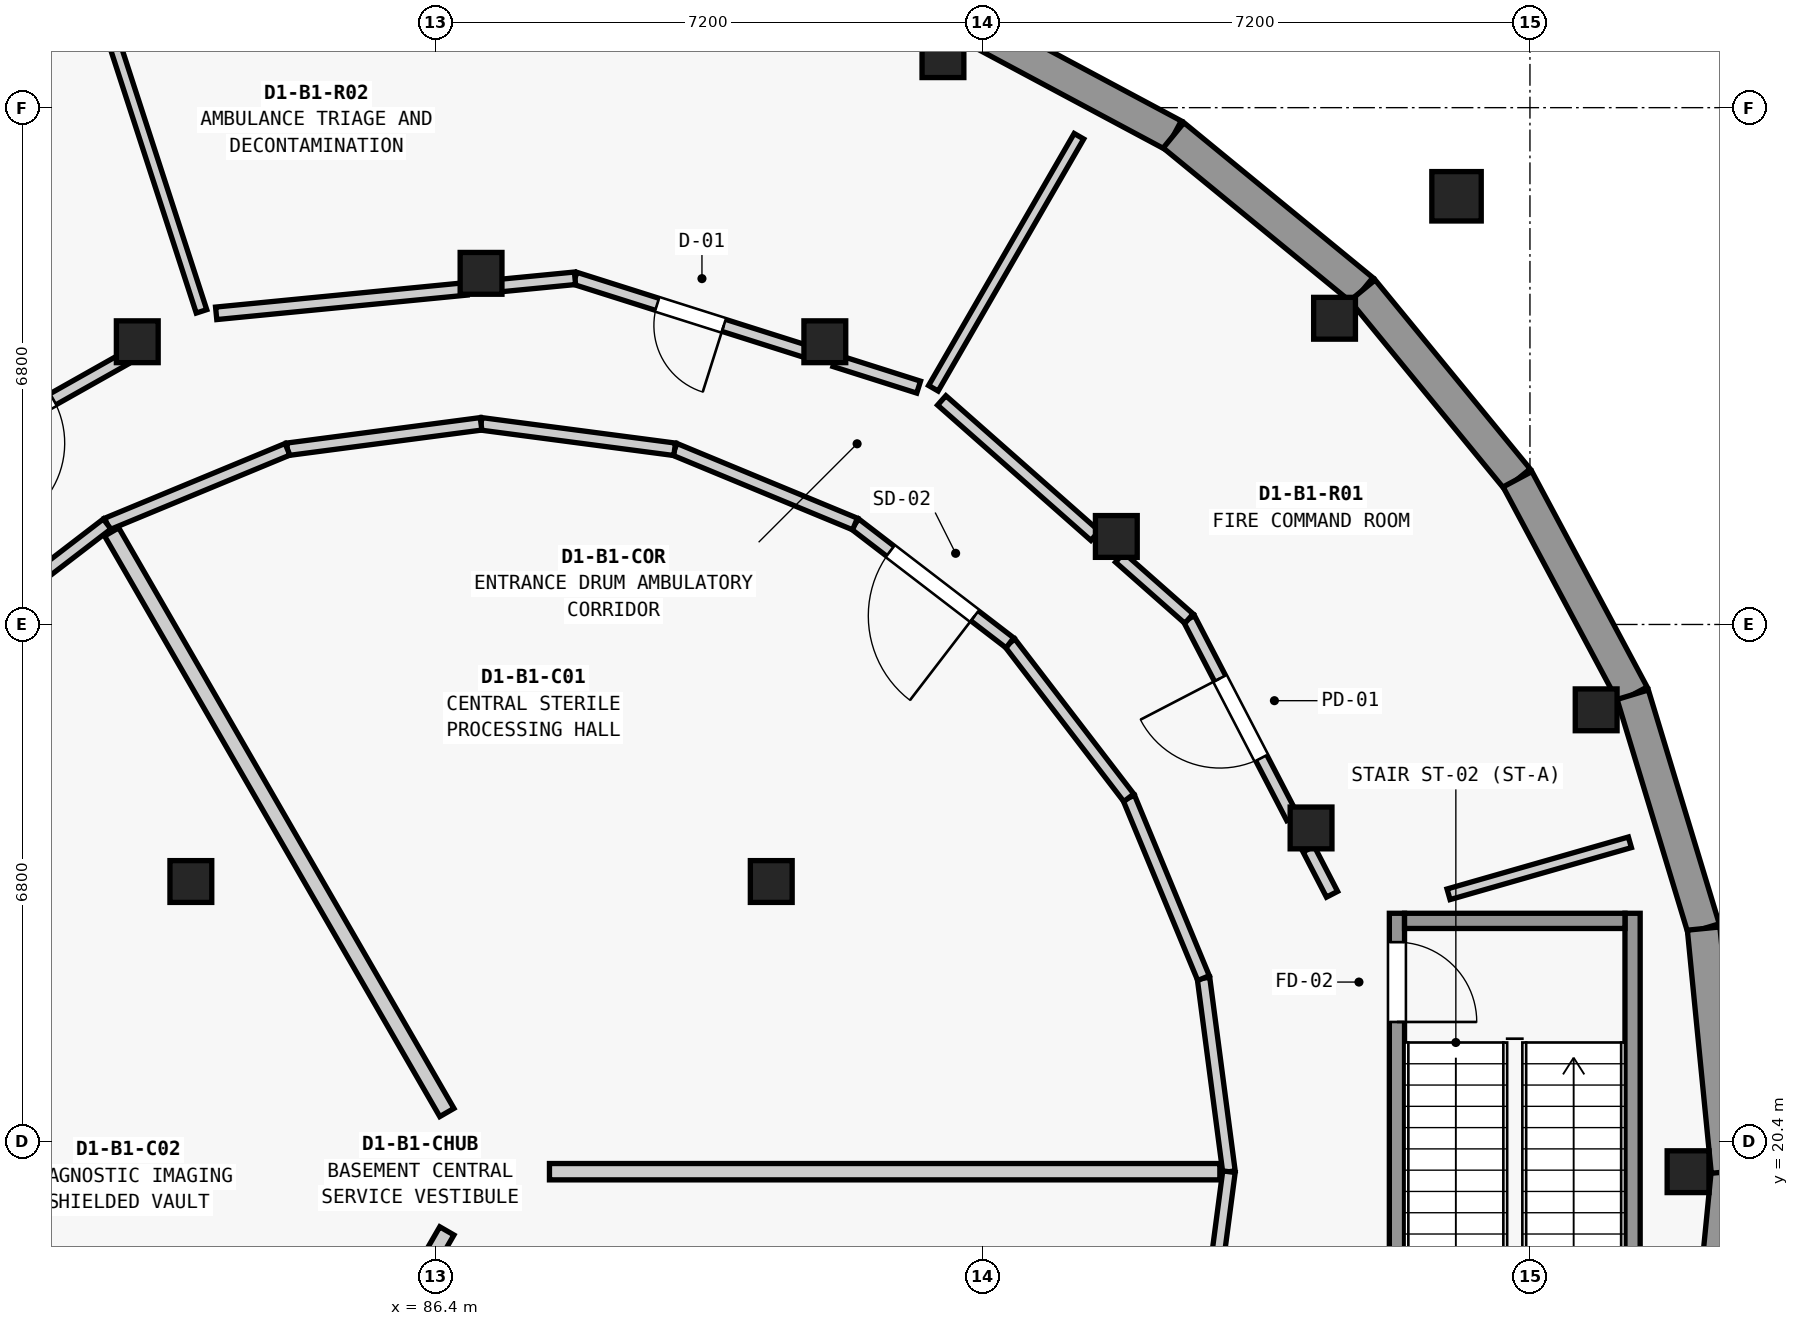
"""IFC4 building model, lengths in metres.
Left out: names, types, materials, properties, quantities, classifications, styles, units other than length and angle.
Written with IfcOpenShell. Run it as: python <this file> out.ifc"""

import sys

from ifc_helpers import new_model, si_unit, direction, frame, frame_2d, origin, origin_2d, place, context, subcontext, project, spatial, rectangle, extrude, element, fill, save


model = new_model("IFC4")
c1 = context("Model", 3, precision=1e-05, world=origin(), true_north=direction((0.0, 1.0)))
c2 = subcontext(c1, "Body", "Model", "MODEL_VIEW")
j1 = project(units=[si_unit("LENGTHUNIT", "METRE"), si_unit("PLANEANGLEUNIT", "RADIAN")], contexts=[c1])
p1 = place(None, origin())
s1 = spatial("IfcSite", under=j1, at=p1, CompositionType="ELEMENT")
p2 = place(p1, origin())
s2 = spatial("IfcBuilding", under=s1, at=p2, CompositionType="ELEMENT")
p3 = place(p2, frame((0.0, 0.0, -4.55)))
s3 = spatial("IfcBuildingStorey", under=s2, at=p3, CompositionType="ELEMENT", Elevation=-4.55)
for number, where, z_axis, x_axis in (
    (1, (102.88, 20.0, 0.0), (0.0, 0.0, 1.0), (1.0, 0.0, 0.0)),
    (2, (101.671, 26.077, 0.0), (0.0, 0.0, 1.0), (1.0, 0.0, 0.0)),
    (3, (98.229, 31.229, 0.0), (0.0, 0.0, 1.0), (1.0, 0.0, 0.0)),
    (4, (93.077, 34.671, 0.0), (0.0, 0.0, 1.0), (1.0, 0.0, 0.0)),
    (5, (97.92, 24.523, 0.0), (0.0, 0.0, 1.0), (1.0, 0.0, 0.0)),
    (6, (95.358, 28.358, 0.0), (0.0, 0.0, 1.0), (1.0, 0.0, 0.0)),
    (7, (91.523, 30.92, 0.0), (0.0, 0.0, 1.0), (1.0, 0.0, 0.0)),
    (8, (87.0, 31.82, 0.0), (0.0, 0.0, 1.0), (1.0, 0.0, 0.0)),
    (9, (82.477, 30.92, 0.0), (0.0, 0.0, 1.0), (1.0, 0.0, 0.0)),
    (10, (90.818, 23.818, 0.0), (0.0, 0.0, 1.0), (1.0, 0.0, 0.0)),
    (11, (83.182, 23.818, 0.0), (0.0, 0.0, 1.0), (1.0, 0.0, 0.0)),
):
    element("IfcColumn", number, at=place(p3, frame(where, z_axis=z_axis, x_axis=x_axis)), inside=s3, PredefinedType="COLUMN", context=c2, shape_type="SweptSolid", body=[
        extrude(rectangle(XDim=0.55, YDim=0.55, at=origin_2d()), origin(), (0.0, 0.0, 1.0), 4.55),
    ])
p4 = place(p3, frame((99.834, 32.834, 0.0), z_axis=(0.0, 0.0, 1.0), x_axis=(1.0, 0.0, 0.0)))
e12 = element("IfcColumn", 12, at=p4, inside=s3, PredefinedType="COLUMN", context=c2, shape_type="SweptSolid", body=[
    extrude(rectangle(XDim=0.65, YDim=0.65, at=origin_2d()), origin(), (0.0, 0.0, 1.0), 4.55),
])
p5 = place(p3, frame((103.4, 20.0, 0.0), z_axis=(0.0, 0.0, 1.0), x_axis=(-0.097977057849, -0.995188673637, 0.0)))
e13 = element("IfcWall", 13, at=p5, inside=s3, PredefinedType="USERDEFINED", context=c2, shape_type="SweptSolid", body=[
    extrude(rectangle(XDim=3.214, YDim=0.43, at=frame_2d((1.607, 0.0))), origin(), (0.0, 0.0, 1.0), 3.335),
])
for number, where, z_axis, x_axis in (
    (14, (93.276, 35.152, 0.0), (0.0, 0.0, 1.0), (0.882, -0.472, 0.0)),
    (15, (96.111, 33.636, 0.0), (0.0, 0.0, 1.0), (0.773, -0.634, 0.0)),
    (16, (98.597, 31.597, 0.0), (0.0, 0.0, 1.0), (0.634, -0.773, 0.0)),
    (17, (100.636, 29.111, 0.0), (0.0, 0.0, 1.0), (0.472, -0.882, 0.0)),
    (18, (102.152, 26.276, 0.0), (0.0, 0.0, 1.0), (0.29, -0.957, 0.0)),
):
    element("IfcWall", number, at=place(p3, frame(where, z_axis=z_axis, x_axis=x_axis)), inside=s3, PredefinedType="USERDEFINED", context=c2, shape_type="SweptSolid", body=[
        extrude(rectangle(XDim=3.215, YDim=0.43, at=frame_2d((1.607, 0.0))), origin(), (0.0, 0.0, 1.0), 3.335),
    ])
p6 = place(p3, frame((103.085, 23.199, 0.0), z_axis=(0.0, 0.0, 1.0), x_axis=(0.097977057849, -0.995188673637, 0.0)))
e19 = element("IfcWall", 19, at=p6, inside=s3, PredefinedType="USERDEFINED", context=c2, shape_type="SweptSolid", body=[
    extrude(rectangle(XDim=3.214, YDim=0.43, at=frame_2d((1.607, 0.0))), origin(), (0.0, 0.0, 1.0), 3.335),
])
p7 = place(p3, frame((99.05, 23.4, 0.0), z_axis=(0.0, 0.0, 1.0), x_axis=(0.0, -1.0, 0.0)))
e20 = element("IfcWall", 20, at=p7, inside=s3, PredefinedType="SHEAR", context=c2, shape_type="SweptSolid", body=[
    extrude(rectangle(XDim=6.8, YDim=0.2, at=frame_2d((3.4, 0.0))), origin(), (0.0, 0.0, 1.0), 4.135),
])
p8 = place(p7, frame((0.38, 0.0, 0.0)))
e21 = element("IfcOpeningElement", 21, at=p8, cuts=e20, PredefinedType="OPENING", context=c2, shape_type="SweptSolid", body=[
    extrude(rectangle(XDim=1.05, YDim=2.15, at=frame_2d((0.525, 1.075))), frame((0.0, 0.11, 0.0), z_axis=(0.0, -1.0, 0.0), x_axis=(1.0, 0.0, 0.0)), (0.0, 0.0, 1.0), 0.22),
])
p9 = place(p3, frame((102.15, 23.4, 0.0), z_axis=(0.0, 0.0, 1.0), x_axis=(0.0, -1.0, 0.0)))
e22 = element("IfcWall", 22, at=p9, inside=s3, PredefinedType="SHEAR", context=c2, shape_type="SweptSolid", body=[
    extrude(rectangle(XDim=6.8, YDim=0.2, at=frame_2d((3.4, 0.0))), origin(), (0.0, 0.0, 1.0), 4.135),
])
p10 = place(p3, frame((99.15, 23.3, 0.0), z_axis=(0.0, 0.0, 1.0), x_axis=(1.0, 0.0, 0.0)))
e23 = element("IfcWall", 23, at=p10, inside=s3, PredefinedType="SHEAR", context=c2, shape_type="SweptSolid", body=[
    extrude(rectangle(XDim=2.9, YDim=0.2, at=frame_2d((1.45, 0.0))), origin(), (0.0, 0.0, 1.0), 4.135),
])
p11 = place(p3, frame((87.9, 20.0, 0.0), z_axis=(0.0, 0.0, 1.0), x_axis=(1.0, 0.0, 0.0)))
e24 = element("IfcWall", 24, at=p11, inside=s3, PredefinedType="SOLIDWALL", context=c2, shape_type="SweptSolid", body=[
    extrude(rectangle(XDim=8.82, YDim=0.215, at=frame_2d((4.41, 0.0))), origin(), (0.0, 0.0, 1.0), 2.76),
])
for number, where, z_axis, x_axis in (
    (25, (86.55, 20.779, 0.0), (0.0, 0.0, 1.0), (-0.5, 0.866, 0.0)),
    (26, (86.55, 19.221, 0.0), (0.0, 0.0, 1.0), (-0.5, -0.866, 0.0)),
):
    element("IfcWall", number, at=place(p3, frame(where, z_axis=z_axis, x_axis=x_axis)), inside=s3, PredefinedType="SOLIDWALL", context=c2, shape_type="SweptSolid", body=[
        extrude(rectangle(XDim=8.821, YDim=0.215, at=frame_2d((4.41, 0.0))), origin(), (0.0, 0.0, 1.0), 2.76),
    ])
p12 = place(p3, frame((96.84, 20.0, 0.0), z_axis=(0.0, 0.0, 1.0), x_axis=(-0.130476636685, 0.991451384224, 0.0)))
e27 = element("IfcWall", 27, at=p12, inside=s3, PredefinedType="PARTITIONING", context=c2, shape_type="SweptSolid", body=[
    extrude(rectangle(XDim=2.569, YDim=0.165, at=frame_2d((1.285, 0.0))), origin(), (0.0, 0.0, 1.0), 2.76),
])
p13 = place(p3, frame((96.505, 22.547, 0.0), z_axis=(0.0, 0.0, 1.0), x_axis=(-0.382704397106, 0.923870848353, 0.0)))
e28 = element("IfcWall", 28, at=p13, inside=s3, PredefinedType="PARTITIONING", context=c2, shape_type="SweptSolid", body=[
    extrude(rectangle(XDim=2.568, YDim=0.165, at=frame_2d((1.284, 0.0))), origin(), (0.0, 0.0, 1.0), 2.76),
])
p14 = place(p3, frame((95.522, 24.92, 0.0), z_axis=(0.0, 0.0, 1.0), x_axis=(-0.608782621434, 0.793337078322, 0.0)))
e29 = element("IfcWall", 29, at=p14, inside=s3, PredefinedType="PARTITIONING", context=c2, shape_type="SweptSolid", body=[
    extrude(rectangle(XDim=2.569, YDim=0.165, at=frame_2d((1.285, 0.0))), origin(), (0.0, 0.0, 1.0), 2.76),
])
p15 = place(p3, frame((93.958, 26.958, 0.0), z_axis=(0.0, 0.0, 1.0), x_axis=(-0.793337078322, 0.608782621434, 0.0)))
e30 = element("IfcWall", 30, at=p15, inside=s3, PredefinedType="PARTITIONING", context=c2, shape_type="SweptSolid", body=[
    extrude(rectangle(XDim=2.569, YDim=0.165, at=frame_2d((1.285, 0.0))), origin(), (0.0, 0.0, 1.0), 2.76),
])
p16 = place(p15, frame((0.584, 0.0, 0.0)))
e31 = element("IfcOpeningElement", 31, at=p16, cuts=e30, PredefinedType="OPENING", context=c2, shape_type="SweptSolid", body=[
    extrude(rectangle(XDim=1.4, YDim=2.25, at=frame_2d((0.7, 1.125))), frame((0.0, 0.093, 0.0), z_axis=(0.0, -1.0, 0.0), x_axis=(1.0, 0.0, 0.0)), (0.0, 0.0, 1.0), 0.185),
])
p17 = place(p3, frame((91.92, 28.522, 0.0), z_axis=(0.0, 0.0, 1.0), x_axis=(-0.923870848353, 0.382704397106, 0.0)))
e32 = element("IfcWall", 32, at=p17, inside=s3, PredefinedType="PARTITIONING", context=c2, shape_type="SweptSolid", body=[
    extrude(rectangle(XDim=2.568, YDim=0.165, at=frame_2d((1.284, 0.0))), origin(), (0.0, 0.0, 1.0), 2.76),
])
for number, where, z_axis, x_axis in (
    (33, (89.547, 29.505, 0.0), (0.0, 0.0, 1.0), (-0.991, 0.13, 0.0)),
    (34, (87.0, 29.84, 0.0), (0.0, 0.0, 1.0), (-0.991, -0.13, 0.0)),
):
    element("IfcWall", number, at=place(p3, frame(where, z_axis=z_axis, x_axis=x_axis)), inside=s3, PredefinedType="PARTITIONING", context=c2, shape_type="SweptSolid", body=[
        extrude(rectangle(XDim=2.569, YDim=0.165, at=frame_2d((1.285, 0.0))), origin(), (0.0, 0.0, 1.0), 2.76),
    ])
p18 = place(p3, frame((84.453, 29.505, 0.0), z_axis=(0.0, 0.0, 1.0), x_axis=(-0.923870848353, -0.382704397106, 0.0)))
e35 = element("IfcWall", 35, at=p18, inside=s3, PredefinedType="PARTITIONING", context=c2, shape_type="SweptSolid", body=[
    extrude(rectangle(XDim=2.568, YDim=0.165, at=frame_2d((1.284, 0.0))), origin(), (0.0, 0.0, 1.0), 2.76),
])
for number, where, z_axis, x_axis in (
    (36, (82.08, 28.522, 0.0), (0.0, 0.0, 1.0), (-0.793, -0.609, 0.0)),
    (37, (96.505, 17.453, 0.0), (0.0, 0.0, 1.0), (0.13, 0.991, 0.0)),
):
    element("IfcWall", number, at=place(p3, frame(where, z_axis=z_axis, x_axis=x_axis)), inside=s3, PredefinedType="PARTITIONING", context=c2, shape_type="SweptSolid", body=[
        extrude(rectangle(XDim=2.569, YDim=0.165, at=frame_2d((1.285, 0.0))), origin(), (0.0, 0.0, 1.0), 2.76),
    ])
p19 = place(p3, frame((99.729, 23.65, 0.0), z_axis=(0.0, 0.0, 1.0), x_axis=(0.96127114667, 0.275604395065, 0.0)))
e38 = element("IfcWall", 38, at=p19, inside=s3, PredefinedType="PARTITIONING", context=c2, shape_type="SweptSolid", body=[
    extrude(rectangle(XDim=2.482, YDim=0.145, at=frame_2d((1.241, 0.0))), origin(), (0.0, 0.0, 1.0), 2.76),
])
p20 = place(p3, frame((92.951, 30.308, 0.0), z_axis=(0.0, 0.0, 1.0), x_axis=(0.500116129234, 0.865958346157, 0.0)))
e39 = element("IfcWall", 39, at=p20, inside=s3, PredefinedType="PARTITIONING", context=c2, shape_type="SweptSolid", body=[
    extrude(rectangle(XDim=3.829, YDim=0.145, at=frame_2d((1.915, 0.0))), origin(), (0.0, 0.0, 1.0), 2.76),
])
p21 = place(p3, frame((83.322, 31.32, 0.0), z_axis=(0.0, 0.0, 1.0), x_axis=(-0.309188585957, 0.951000745696, 0.0)))
e40 = element("IfcWall", 40, at=p21, inside=s3, PredefinedType="PARTITIONING", context=c2, shape_type="SweptSolid", body=[
    extrude(rectangle(XDim=3.823, YDim=0.145, at=frame_2d((1.912, 0.0))), origin(), (0.0, 0.0, 1.0), 2.76),
])
p22 = place(p3, frame((98.196, 23.65, 0.0), z_axis=(0.0, 0.0, 1.0), x_axis=(-0.459700365361, 0.888074081418, 0.0)))
e41 = element("IfcWall", 41, at=p22, inside=s3, PredefinedType="PARTITIONING", context=c2, shape_type="SweptSolid", body=[
    extrude(rectangle(XDim=0.67, YDim=0.165, at=frame_2d((0.335, 0.0))), origin(), (0.0, 0.0, 1.0), 2.76),
])
p23 = place(p3, frame((97.674, 24.657, 0.0), z_axis=(0.0, 0.0, 1.0), x_axis=(-0.460725075704, 0.887542902973, 0.0)))
e42 = element("IfcWall", 42, at=p23, inside=s3, PredefinedType="PARTITIONING", context=c2, shape_type="SweptSolid", body=[
    extrude(rectangle(XDim=2.952, YDim=0.165, at=frame_2d((1.476, 0.0))), origin(), (0.0, 0.0, 1.0), 2.76),
])
p24 = place(p23, frame((0.886, 0.0, 0.0)))
e43 = element("IfcOpeningElement", 43, at=p24, cuts=e42, PredefinedType="OPENING", context=c2, shape_type="SweptSolid", body=[
    extrude(rectangle(XDim=1.18, YDim=2.2, at=frame_2d((0.59, 1.1))), frame((0.0, 0.093, 0.0), z_axis=(0.0, -1.0, 0.0), x_axis=(1.0, 0.0, 0.0)), (0.0, 0.0, 1.0), 0.185),
])
p25 = place(p3, frame((96.314, 27.277, 0.0), z_axis=(0.0, 0.0, 1.0), x_axis=(-0.749697254826, 0.661780950244, 0.0)))
e44 = element("IfcWall", 44, at=p25, inside=s3, PredefinedType="PARTITIONING", context=c2, shape_type="SweptSolid", body=[
    extrude(rectangle(XDim=1.216, YDim=0.165, at=frame_2d((0.608, 0.0))), origin(), (0.0, 0.0, 1.0), 2.76),
])
p26 = place(p3, frame((95.078, 28.368, 0.0), z_axis=(0.0, 0.0, 1.0), x_axis=(-0.749753094518, 0.661717686979, 0.0)))
e45 = element("IfcWall", 45, at=p26, inside=s3, PredefinedType="PARTITIONING", context=c2, shape_type="SweptSolid", body=[
    extrude(rectangle(XDim=2.69, YDim=0.165, at=frame_2d((1.345, 0.0))), origin(), (0.0, 0.0, 1.0), 2.76),
])
p27 = place(p3, frame((92.757, 30.323, 0.0), z_axis=(0.0, 0.0, 1.0), x_axis=(-0.95314164885, 0.302524374602, 0.0)))
e46 = element("IfcWall", 46, at=p27, inside=s3, PredefinedType="PARTITIONING", context=c2, shape_type="SweptSolid", body=[
    extrude(rectangle(XDim=1.157, YDim=0.165, at=frame_2d((0.579, 0.0))), origin(), (0.0, 0.0, 1.0), 2.76),
])
p28 = place(p3, frame((91.274, 30.793, 0.0), z_axis=(0.0, 0.0, 1.0), x_axis=(-0.953348472905, 0.301871974865, 0.0)))
e47 = element("IfcWall", 47, at=p28, inside=s3, PredefinedType="PARTITIONING", context=c2, shape_type="SweptSolid", body=[
    extrude(rectangle(XDim=3.187, YDim=0.165, at=frame_2d((1.593, 0.0))), origin(), (0.0, 0.0, 1.0), 2.76),
])
p29 = place(p28, frame((1.133, 0.0, 0.0)))
e48 = element("IfcOpeningElement", 48, at=p29, cuts=e47, PredefinedType="OPENING", context=c2, shape_type="SweptSolid", body=[
    extrude(rectangle(XDim=0.92, YDim=2.12, at=frame_2d((0.46, 1.06))), frame((0.0, 0.093, 0.0), z_axis=(0.0, -1.0, 0.0), x_axis=(1.0, 0.0, 0.0)), (0.0, 0.0, 1.0), 0.185),
])
p30 = place(p3, frame((88.236, 31.755, 0.0), z_axis=(0.0, 0.0, 1.0), x_axis=(-0.995326148944, -0.096570478037, 0.0)))
e49 = element("IfcWall", 49, at=p30, inside=s3, PredefinedType="PARTITIONING", context=c2, shape_type="SweptSolid", body=[
    extrude(rectangle(XDim=1.014, YDim=0.165, at=frame_2d((0.507, 0.0))), origin(), (0.0, 0.0, 1.0), 2.76),
])
p31 = place(p3, frame((86.809, 31.616, 0.0), z_axis=(0.0, 0.0, 1.0), x_axis=(-0.995256012435, -0.09729064555, 0.0)))
e50 = element("IfcWall", 50, at=p31, inside=s3, PredefinedType="PARTITIONING", context=c2, shape_type="SweptSolid", body=[
    extrude(rectangle(XDim=3.31, YDim=0.165, at=frame_2d((1.655, 0.0))), origin(), (0.0, 0.0, 1.0), 2.76),
])
p32 = place(p3, frame((82.311, 30.695, 0.0), z_axis=(0.0, 0.0, 1.0), x_axis=(-0.871081128007, -0.491139153836, 0.0)))
e51 = element("IfcWall", 51, at=p32, inside=s3, PredefinedType="PARTITIONING", context=c2, shape_type="SweptSolid", body=[
    extrude(rectangle(XDim=3.339, YDim=0.165, at=frame_2d((1.67, 0.0))), origin(), (0.0, 0.0, 1.0), 2.76),
])
p33 = place(p32, frame((1.08, 0.0, 0.0)))
e52 = element("IfcOpeningElement", 52, at=p33, cuts=e51, PredefinedType="OPENING", context=c2, shape_type="SweptSolid", body=[
    extrude(rectangle(XDim=1.18, YDim=2.2, at=frame_2d((0.59, 1.1))), frame((0.0, 0.093, 0.0), z_axis=(0.0, -1.0, 0.0), x_axis=(1.0, 0.0, 0.0)), (0.0, 0.0, 1.0), 0.185),
])
p34 = place(p8, origin())
e53 = element("IfcDoor", 53, at=p34, inside=s3, OperationType="SINGLE_SWING_RIGHT", PredefinedType="DOOR", context=c2, shape_type="SweptSolid", body=[
    extrude(rectangle(XDim=1.05, YDim=2.15, at=frame_2d((0.525, 1.075))), frame((0.0, 0.025, 0.0), z_axis=(0.0, -1.0, 0.0), x_axis=(1.0, 0.0, 0.0)), (0.0, 0.0, 1.0), 0.05),
])
fill(e21, e53)
p35 = place(p16, origin())
e54 = element("IfcDoor", 54, at=p35, inside=s3, OperationType="SINGLE_SWING_LEFT", PredefinedType="DOOR", context=c2, shape_type="SweptSolid", body=[
    extrude(rectangle(XDim=1.4, YDim=2.25, at=frame_2d((0.7, 1.125))), frame((0.0, 0.025, 0.0), z_axis=(0.0, -1.0, 0.0), x_axis=(1.0, 0.0, 0.0)), (0.0, 0.0, 1.0), 0.05),
])
fill(e31, e54)
p36 = place(p24, origin())
e55 = element("IfcDoor", 55, at=p36, inside=s3, OperationType="SINGLE_SWING_RIGHT", PredefinedType="DOOR", context=c2, shape_type="SweptSolid", body=[
    extrude(rectangle(XDim=1.18, YDim=2.2, at=frame_2d((0.59, 1.1))), frame((0.0, 0.025, 0.0), z_axis=(0.0, -1.0, 0.0), x_axis=(1.0, 0.0, 0.0)), (0.0, 0.0, 1.0), 0.05),
])
fill(e43, e55)
p37 = place(p29, origin())
e56 = element("IfcDoor", 56, at=p37, inside=s3, OperationType="SINGLE_SWING_LEFT", PredefinedType="DOOR", context=c2, shape_type="SweptSolid", body=[
    extrude(rectangle(XDim=0.92, YDim=2.12, at=frame_2d((0.46, 1.06))), frame((0.0, 0.025, 0.0), z_axis=(0.0, -1.0, 0.0), x_axis=(1.0, 0.0, 0.0)), (0.0, 0.0, 1.0), 0.05),
])
fill(e48, e56)
p38 = place(p33, origin())
e57 = element("IfcDoor", 57, at=p38, inside=s3, OperationType="SINGLE_SWING_RIGHT", PredefinedType="DOOR", context=c2, shape_type="SweptSolid", body=[
    extrude(rectangle(XDim=1.18, YDim=2.2, at=frame_2d((0.59, 1.1))), frame((0.0, 0.025, 0.0), z_axis=(0.0, -1.0, 0.0), x_axis=(1.0, 0.0, 0.0)), (0.0, 0.0, 1.0), 0.05),
])
fill(e52, e57)
save(model, sys.argv[1])
